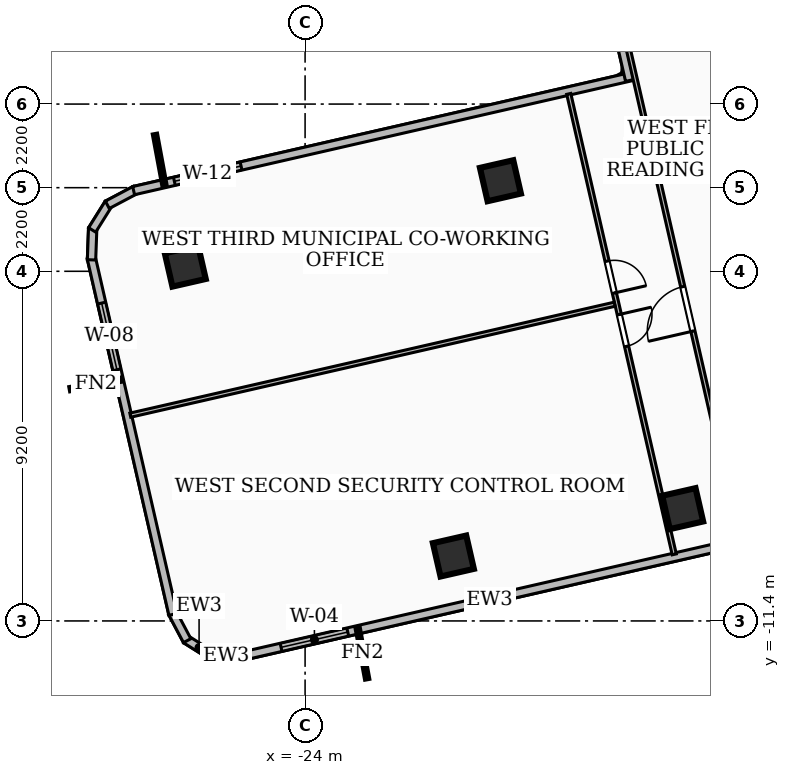
"""IFC4 building model, lengths in metres.
Left out: names, types, materials, properties, quantities, classifications, styles, units other than length and angle.
Written with IfcOpenShell. Run it as: python <this file> out.ifc"""

import sys

from ifc_helpers import new_model, si_unit, direction, frame, frame_2d, origin, origin_2d, place, context, subcontext, project, spatial, rectangle, extrude, element, fill, save


model = new_model("IFC4")
c1 = context("Model", 3, precision=1e-05, world=origin(), true_north=direction((0.0, 1.0)))
c2 = subcontext(c1, "Body", "Model", "MODEL_VIEW")
j1 = project(units=[si_unit("LENGTHUNIT", "METRE"), si_unit("PLANEANGLEUNIT", "RADIAN")], contexts=[c1])
p1 = place(None, origin())
s1 = spatial("IfcSite", under=j1, at=p1, CompositionType="ELEMENT")
p2 = place(p1, origin())
s2 = spatial("IfcBuilding", under=s1, at=p2, CompositionType="ELEMENT")
p3 = place(p2, frame((0.0, 0.0, 116.28)))
s3 = spatial("IfcBuildingStorey", under=s2, at=p3, CompositionType="ELEMENT", Elevation=116.28)
for number, where, z_axis, x_axis in (
    (1, (-18.86, 0.183, 0.0), (0.0, 0.0, 1.0), (0.975, 0.223, 0.0)),
    (2, (-14.064, -8.445, 0.0), (0.0, 0.0, 1.0), (0.975, 0.223, 0.0)),
    (3, (-27.153, -2.064, 0.0), (0.0, 0.0, 1.0), (0.975, 0.223, 0.0)),
    (4, (-20.098, -9.692, 0.0), (0.0, 0.0, 1.0), (0.975, 0.223, 0.0)),
):
    element("IfcColumn", number, at=place(p3, frame(where, z_axis=z_axis, x_axis=x_axis)), inside=s3, PredefinedType="COLUMN", context=c2, shape_type="SweptSolid", body=[
        extrude(rectangle(XDim=0.9, YDim=0.9, at=origin_2d()), origin(), (0.0, 0.0, 1.0), 3.6),
    ])
p4 = place(p3, frame((-12.585, -9.335, 0.0), z_axis=(0.0, 0.0, 1.0), x_axis=(-0.974754036658, -0.223281365141, 0.0)))
e5 = element("IfcWall", 5, at=p4, inside=s3, PredefinedType="SOLIDWALL", context=c2, shape_type="SweptSolid", body=[
    extrude(rectangle(XDim=13.459, YDim=0.22, at=frame_2d((6.729, 0.0))), origin(), (0.0, 0.0, 1.0), 3.34),
])
p5 = place(p4, frame((10.559, 0.0, 0.85)))
e6 = element("IfcOpeningElement", 6, at=p5, cuts=e5, PredefinedType="OPENING", context=c2, shape_type="SweptSolid", body=[
    extrude(rectangle(XDim=1.8, YDim=2.0, at=frame_2d((0.9, 1.0))), frame((0.0, 0.12, 0.0), z_axis=(0.0, -1.0, 0.0), x_axis=(1.0, 0.0, 0.0)), (0.0, 0.0, 1.0), 0.24),
])
p6 = place(p3, frame((-25.655, -12.335, 0.0), z_axis=(0.0, 0.0, 1.0), x_axis=(-0.999352376715, 0.035983706773, 0.0)))
e7 = element("IfcWall", 7, at=p6, inside=s3, PredefinedType="SOLIDWALL", context=c2, shape_type="SweptSolid", body=[
    extrude(rectangle(XDim=0.834, YDim=0.22, at=frame_2d((0.417, 0.0))), origin(), (0.0, 0.0, 1.0), 3.34),
])
p7 = place(p3, frame((-26.443, -12.319, 0.0), z_axis=(0.0, 0.0, 1.0), x_axis=(-0.846889988853, 0.531768132536, 0.0)))
e8 = element("IfcWall", 8, at=p7, inside=s3, PredefinedType="SOLIDWALL", context=c2, shape_type="SweptSolid", body=[
    extrude(rectangle(XDim=0.818, YDim=0.22, at=frame_2d((0.409, 0.0))), origin(), (0.0, 0.0, 1.0), 3.34),
])
p8 = place(p3, frame((-27.103, -11.919, 0.0), z_axis=(0.0, 0.0, 1.0), x_axis=(-0.468506090516, 0.883460266876, 0.0)))
e9 = element("IfcWall", 9, at=p8, inside=s3, PredefinedType="SOLIDWALL", context=c2, shape_type="SweptSolid", body=[
    extrude(rectangle(XDim=0.834, YDim=0.22, at=frame_2d((0.417, 0.0))), origin(), (0.0, 0.0, 1.0), 3.34),
])
p9 = place(p3, frame((-27.476, -11.228, 0.0), z_axis=(0.0, 0.0, 1.0), x_axis=(-0.223358074049, 0.974736462208, 0.0)))
e10 = element("IfcWall", 10, at=p9, inside=s3, PredefinedType="SOLIDWALL", context=c2, shape_type="SweptSolid", body=[
    extrude(rectangle(XDim=9.621, YDim=0.22, at=frame_2d((4.811, 0.0))), origin(), (0.0, 0.0, 1.0), 3.34),
])
p10 = place(p9, frame((6.604, 0.0, 0.85)))
e11 = element("IfcOpeningElement", 11, at=p10, cuts=e10, PredefinedType="OPENING", context=c2, shape_type="SweptSolid", body=[
    extrude(rectangle(XDim=1.8, YDim=1.8, at=frame_2d((0.9, 0.9))), frame((0.0, 0.12, 0.0), z_axis=(0.0, -1.0, 0.0), x_axis=(1.0, 0.0, 0.0)), (0.0, 0.0, 1.0), 0.24),
])
p11 = place(p3, frame((-29.62, -1.899, 0.0), z_axis=(0.0, 0.0, 1.0), x_axis=(0.037195813461, 0.999307996296, 0.0)))
e12 = element("IfcWall", 12, at=p11, inside=s3, PredefinedType="SOLIDWALL", context=c2, shape_type="SweptSolid", body=[
    extrude(rectangle(XDim=0.833, YDim=0.22, at=frame_2d((0.417, 0.0))), origin(), (0.0, 0.0, 1.0), 3.34),
])
p12 = place(p3, frame((-29.603, -1.112, 0.0), z_axis=(0.0, 0.0, 1.0), x_axis=(0.530240177466, 0.847847482865, 0.0)))
e13 = element("IfcWall", 13, at=p12, inside=s3, PredefinedType="SOLIDWALL", context=c2, shape_type="SweptSolid", body=[
    extrude(rectangle(XDim=0.819, YDim=0.22, at=frame_2d((0.409, 0.0))), origin(), (0.0, 0.0, 1.0), 3.34),
])
p13 = place(p3, frame((-29.204, -0.451, 0.0), z_axis=(0.0, 0.0, 1.0), x_axis=(0.883716798585, 0.468022029287, 0.0)))
e14 = element("IfcWall", 14, at=p13, inside=s3, PredefinedType="SOLIDWALL", context=c2, shape_type="SweptSolid", body=[
    extrude(rectangle(XDim=0.835, YDim=0.22, at=frame_2d((0.417, 0.0))), origin(), (0.0, 0.0, 1.0), 3.34),
])
p14 = place(p3, frame((-28.512, -0.078, 0.0), z_axis=(0.0, 0.0, 1.0), x_axis=(0.974753462872, 0.223283870038, 0.0)))
e15 = element("IfcWall", 15, at=p14, inside=s3, PredefinedType="SOLIDWALL", context=c2, shape_type="SweptSolid", body=[
    extrude(rectangle(XDim=13.458, YDim=0.22, at=frame_2d((6.729, 0.0))), origin(), (0.0, 0.0, 1.0), 3.34),
])
p15 = place(p14, frame((1.1, 0.0, 0.85)))
e16 = element("IfcOpeningElement", 16, at=p15, cuts=e15, PredefinedType="OPENING", context=c2, shape_type="SweptSolid", body=[
    extrude(rectangle(XDim=1.8, YDim=1.6, at=frame_2d((0.9, 0.8))), frame((0.0, 0.12, 0.0), z_axis=(0.0, -1.0, 0.0), x_axis=(1.0, 0.0, 0.0)), (0.0, 0.0, 1.0), 0.24),
])
p16 = place(p3, frame((-15.46, 2.821, 0.0), z_axis=(0.0, 0.0, 1.0), x_axis=(-0.223278912438, 0.974754598481, 0.0)))
e17 = element("IfcWall", 17, at=p16, inside=s3, PredefinedType="SOLIDWALL", context=c2, shape_type="SweptSolid", body=[
    extrude(rectangle(XDim=6.759, YDim=0.22, at=frame_2d((3.379, 0.0))), origin(), (0.0, 0.0, 1.0), 3.34),
])
p17 = place(p3, frame((-11.692, -12.957, 0.0), z_axis=(0.0, 0.0, 1.0), x_axis=(-0.223262093598, 0.97475845088, 0.0)))
e18 = element("IfcWall", 18, at=p17, inside=s3, PredefinedType="PARTITIONING", context=c2, shape_type="SweptSolid", body=[
    extrude(rectangle(XDim=20.04, YDim=0.11, at=frame_2d((10.02, 0.0))), origin(), (0.0, 0.0, 1.0), 2.57),
])
p18 = place(p17, frame((9.42, 0.0, 0.0)))
e19 = element("IfcOpeningElement", 19, at=p18, cuts=e18, PredefinedType="OPENING", context=c2, shape_type="SweptSolid", body=[
    extrude(rectangle(XDim=1.2, YDim=2.1, at=frame_2d((0.6, 1.05))), frame((0.0, 0.065, 0.0), z_axis=(0.0, -1.0, 0.0), x_axis=(1.0, 0.0, 0.0)), (0.0, 0.0, 1.0), 0.13),
])
p19 = place(p3, frame((-15.855, -3.067, 0.0), z_axis=(0.0, 0.0, 1.0), x_axis=(-0.974758398925, -0.223262320434, 0.0)))
e20 = element("IfcWall", 20, at=p19, inside=s3, PredefinedType="PARTITIONING", context=c2, shape_type="SweptSolid", body=[
    extrude(rectangle(XDim=13.075, YDim=0.11, at=frame_2d((6.538, 0.0))), origin(), (0.0, 0.0, 1.0), 2.72),
])
p20 = place(p3, frame((-17.062, 2.468, 0.0), z_axis=(0.0, 0.0, 1.0), x_axis=(0.223341555051, -0.974740247341, 0.0)))
e21 = element("IfcWall", 21, at=p20, inside=s3, PredefinedType="PARTITIONING", context=c2, shape_type="SweptSolid", body=[
    extrude(rectangle(XDim=12.43, YDim=0.11, at=frame_2d((6.215, 0.0))), origin(), (0.0, 0.0, 1.0), 2.57),
])
p21 = place(p20, frame((4.515, 0.0, 0.0)))
e22 = element("IfcOpeningElement", 22, at=p21, cuts=e21, PredefinedType="OPENING", context=c2, shape_type="SweptSolid", body=[
    extrude(rectangle(XDim=0.86, YDim=2.04, at=frame_2d((0.43, 1.02))), frame((0.0, 0.065, 0.0), z_axis=(0.0, -1.0, 0.0), x_axis=(1.0, 0.0, 0.0)), (0.0, 0.0, 1.0), 0.13),
])
p22 = place(p20, frame((5.955, 0.0, 0.0)))
e23 = element("IfcOpeningElement", 23, at=p22, cuts=e21, PredefinedType="OPENING", context=c2, shape_type="SweptSolid", body=[
    extrude(rectangle(XDim=0.86, YDim=2.04, at=frame_2d((0.43, 1.02))), frame((0.0, 0.065, 0.0), z_axis=(0.0, -1.0, 0.0), x_axis=(1.0, 0.0, 0.0)), (0.0, 0.0, 1.0), 0.13),
])
p23 = place(p5, origin())
e24 = element("IfcWindow", 24, at=p23, inside=s3, PartitioningType="SINGLE_PANEL", PredefinedType="WINDOW", context=c2, shape_type="SweptSolid", body=[
    extrude(rectangle(XDim=1.8, YDim=2.0, at=frame_2d((0.9, 1.0))), frame((0.0, 0.03, 0.0), z_axis=(0.0, -1.0, 0.0), x_axis=(1.0, 0.0, 0.0)), (0.0, 0.0, 1.0), 0.06),
])
fill(e6, e24)
p24 = place(p10, origin())
e25 = element("IfcWindow", 25, at=p24, inside=s3, PartitioningType="SINGLE_PANEL", PredefinedType="WINDOW", context=c2, shape_type="SweptSolid", body=[
    extrude(rectangle(XDim=1.8, YDim=1.8, at=frame_2d((0.9, 0.9))), frame((0.0, 0.03, 0.0), z_axis=(0.0, -1.0, 0.0), x_axis=(1.0, 0.0, 0.0)), (0.0, 0.0, 1.0), 0.06),
])
fill(e11, e25)
p25 = place(p15, origin())
e26 = element("IfcWindow", 26, at=p25, inside=s3, PartitioningType="SINGLE_PANEL", PredefinedType="WINDOW", context=c2, shape_type="SweptSolid", body=[
    extrude(rectangle(XDim=1.8, YDim=1.6, at=frame_2d((0.9, 0.8))), frame((0.0, 0.03, 0.0), z_axis=(0.0, -1.0, 0.0), x_axis=(1.0, 0.0, 0.0)), (0.0, 0.0, 1.0), 0.06),
])
fill(e16, e26)
p26 = place(p18, origin())
e27 = element("IfcDoor", 27, at=p26, inside=s3, OperationType="SINGLE_SWING_LEFT", PredefinedType="DOOR", context=c2, shape_type="SweptSolid", body=[
    extrude(rectangle(XDim=1.2, YDim=2.1, at=frame_2d((0.6, 1.05))), frame((0.0, 0.025, 0.0), z_axis=(0.0, -1.0, 0.0), x_axis=(1.0, 0.0, 0.0)), (0.0, 0.0, 1.0), 0.05),
])
fill(e19, e27)
p27 = place(p21, origin())
e28 = element("IfcDoor", 28, at=p27, inside=s3, OperationType="SINGLE_SWING_RIGHT", PredefinedType="DOOR", context=c2, shape_type="SweptSolid", body=[
    extrude(rectangle(XDim=0.86, YDim=2.04, at=frame_2d((0.43, 1.02))), frame((0.0, 0.025, 0.0), z_axis=(0.0, -1.0, 0.0), x_axis=(1.0, 0.0, 0.0)), (0.0, 0.0, 1.0), 0.05),
])
fill(e22, e28)
p28 = place(p22, origin())
e29 = element("IfcDoor", 29, at=p28, inside=s3, OperationType="SINGLE_SWING_LEFT", PredefinedType="DOOR", context=c2, shape_type="SweptSolid", body=[
    extrude(rectangle(XDim=0.86, YDim=2.04, at=frame_2d((0.43, 1.02))), frame((0.0, 0.025, 0.0), z_axis=(0.0, -1.0, 0.0), x_axis=(1.0, 0.0, 0.0)), (0.0, 0.0, 1.0), 0.05),
])
fill(e23, e29)
save(model, sys.argv[1])
